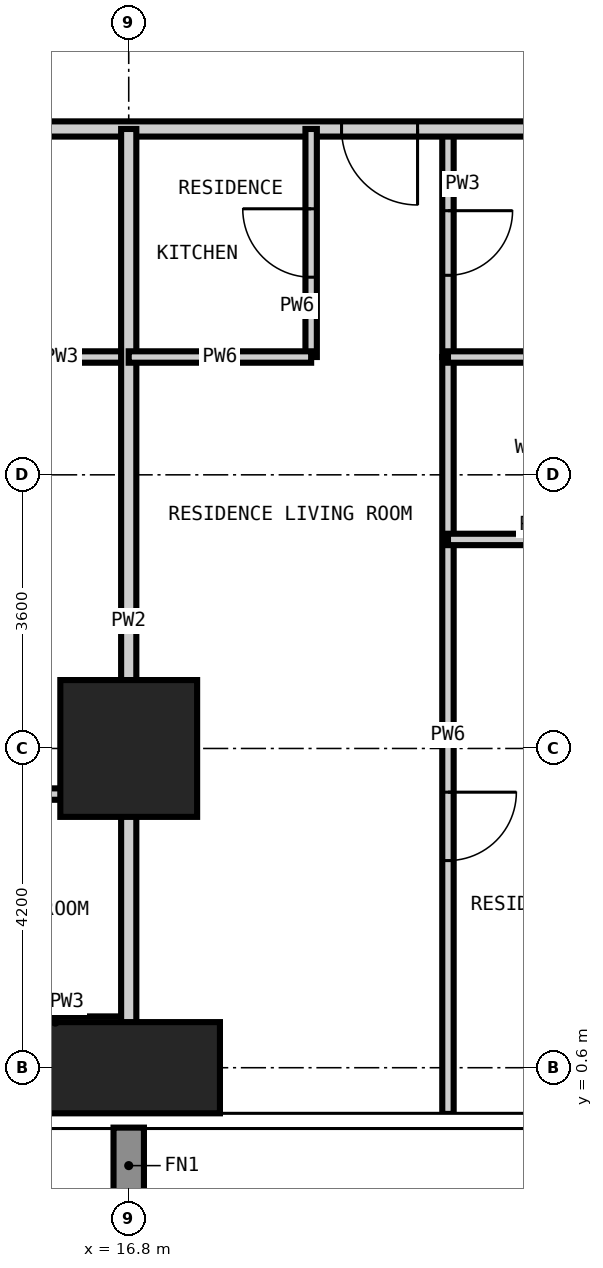
"""IFC4 building model, lengths in metres.
Left out: names, types, materials, properties, quantities, classifications, styles, units other than length and angle.
Written with IfcOpenShell. Run it as: python <this file> out.ifc"""

import sys

from ifc_helpers import new_model, si_unit, direction, frame, frame_2d, origin, origin_2d, place, context, subcontext, project, spatial, rectangle, extrude, element, fill, save


model = new_model("IFC4")
c1 = context("Model", 3, precision=1e-05, world=origin(), true_north=direction((0.0, 1.0)))
c2 = subcontext(c1, "Body", "Model", "MODEL_VIEW")
j1 = project(units=[si_unit("LENGTHUNIT", "METRE"), si_unit("PLANEANGLEUNIT", "RADIAN")], contexts=[c1])
p1 = place(None, origin())
s1 = spatial("IfcSite", under=j1, at=p1, CompositionType="ELEMENT")
p2 = place(p1, origin())
s2 = spatial("IfcBuilding", under=s1, at=p2, CompositionType="ELEMENT")
p3 = place(p2, frame((0.0, 0.0, 45.0)))
s3 = spatial("IfcBuildingStorey", under=s2, at=p3, CompositionType="ELEMENT", Elevation=45.0)
p4 = place(p3, frame((16.8, 0.6, -0.35), z_axis=(0.0, 0.0, 1.0), x_axis=(1.0, 0.0, 0.0)))
e1 = element("IfcColumn", 1, at=p4, inside=s3, PredefinedType="COLUMN", context=c2, shape_type="SweptSolid", body=[
    extrude(rectangle(XDim=2.4, YDim=1.2, at=origin_2d()), origin(), (0.0, 0.0, 1.0), 3.6),
])
p5 = place(p3, frame((16.8, 4.8, -0.35), z_axis=(0.0, 0.0, 1.0), x_axis=(1.0, 0.0, 0.0)))
e2 = element("IfcColumn", 2, at=p5, inside=s3, PredefinedType="COLUMN", context=c2, shape_type="SweptSolid", body=[
    extrude(rectangle(XDim=1.8, YDim=1.8, at=origin_2d()), origin(), (0.0, 0.0, 1.0), 3.6),
])
p6 = place(p3, frame((21.0, 9.95, 0.0), z_axis=(0.0, 0.0, 1.0), x_axis=(0.0, 1.0, 0.0)))
e3 = element("IfcWall", 3, at=p6, inside=s3, PredefinedType="PARTITIONING", context=c2, shape_type="SweptSolid", body=[
    extrude(rectangle(XDim=3.0, YDim=0.15, at=frame_2d((1.5, 0.0))), origin(), (0.0, 0.0, 1.0), 3.25),
])
p7 = place(p6, frame((1.075, 0.0, 0.0)))
e4 = element("IfcOpeningElement", 4, at=p7, cuts=e3, PredefinedType="OPENING", context=c2, shape_type="SweptSolid", body=[
    extrude(rectangle(XDim=0.85, YDim=2.1, at=frame_2d((0.425, 1.05))), frame((0.0, 0.085, 0.0), z_axis=(0.0, -1.0, 0.0), x_axis=(1.0, 0.0, 0.0)), (0.0, 0.0, 1.0), 0.17),
])
p8 = place(p3, frame((13.2, 1.2, 0.0), z_axis=(0.0, 0.0, 1.0), x_axis=(1.0, 0.0, 0.0)))
e5 = element("IfcWall", 5, at=p8, inside=s3, PredefinedType="PARTITIONING", context=c2, shape_type="SweptSolid", body=[
    extrude(rectangle(XDim=3.6, YDim=0.15, at=frame_2d((1.8, 0.0))), origin(), (0.0, 0.0, 1.0), 3.25),
])
p9 = place(p8, frame((1.375, 0.0, 0.0)))
e6 = element("IfcOpeningElement", 6, at=p9, cuts=e5, PredefinedType="OPENING", context=c2, shape_type="SweptSolid", body=[
    extrude(rectangle(XDim=0.85, YDim=2.1, at=frame_2d((0.425, 1.05))), frame((0.0, 0.085, 0.0), z_axis=(0.0, -1.0, 0.0), x_axis=(1.0, 0.0, 0.0)), (0.0, 0.0, 1.0), 0.17),
])
p10 = place(p3, frame((12.95, 9.95, 0.0), z_axis=(0.0, 0.0, 1.0), x_axis=(1.0, 0.0, 0.0)))
e7 = element("IfcWall", 7, at=p10, inside=s3, PredefinedType="PARTITIONING", context=c2, shape_type="SweptSolid", body=[
    extrude(rectangle(XDim=3.85, YDim=0.15, at=frame_2d((1.925, 0.0))), origin(), (0.0, 0.0, 1.0), 3.25),
])
p11 = place(p10, frame((1.5, 0.0, 0.0)))
e8 = element("IfcOpeningElement", 8, at=p11, cuts=e7, PredefinedType="OPENING", context=c2, shape_type="SweptSolid", body=[
    extrude(rectangle(XDim=0.85, YDim=2.1, at=frame_2d((0.425, 1.05))), frame((0.0, 0.085, 0.0), z_axis=(0.0, -1.0, 0.0), x_axis=(1.0, 0.0, 0.0)), (0.0, 0.0, 1.0), 0.17),
])
p12 = place(p3, frame((45.25, 12.95, 0.0), z_axis=(0.0, 0.0, 1.0), x_axis=(-1.0, 0.0, 0.0)))
e9 = element("IfcWall", 9, at=p12, inside=s3, PredefinedType="PARTITIONING", context=c2, shape_type="SweptSolid", body=[
    extrude(rectangle(XDim=32.3, YDim=0.2, at=frame_2d((16.15, 0.0))), origin(), (0.0, 0.0, 1.0), 3.25),
])
p13 = place(p12, frame((24.65, 0.0, 0.0)))
e10 = element("IfcOpeningElement", 10, at=p13, cuts=e9, PredefinedType="OPENING", context=c2, shape_type="SweptSolid", body=[
    extrude(rectangle(XDim=1.0, YDim=2.2, at=frame_2d((0.5, 1.1))), frame((0.0, 0.11, 0.0), z_axis=(0.0, -1.0, 0.0), x_axis=(1.0, 0.0, 0.0)), (0.0, 0.0, 1.0), 0.22),
])
p14 = place(p12, frame((16.25, 0.0, 0.0)))
e11 = element("IfcOpeningElement", 11, at=p14, cuts=e9, PredefinedType="OPENING", context=c2, shape_type="SweptSolid", body=[
    extrude(rectangle(XDim=1.0, YDim=2.2, at=frame_2d((0.5, 1.1))), frame((0.0, 0.11, 0.0), z_axis=(0.0, -1.0, 0.0), x_axis=(1.0, 0.0, 0.0)), (0.0, 0.0, 1.0), 0.22),
])
p15 = place(p12, frame((7.85, 0.0, 0.0)))
e12 = element("IfcOpeningElement", 12, at=p15, cuts=e9, PredefinedType="OPENING", context=c2, shape_type="SweptSolid", body=[
    extrude(rectangle(XDim=1.0, YDim=2.2, at=frame_2d((0.5, 1.1))), frame((0.0, 0.11, 0.0), z_axis=(0.0, -1.0, 0.0), x_axis=(1.0, 0.0, 0.0)), (0.0, 0.0, 1.0), 0.22),
])
p16 = place(p3, frame((16.8, -0.008, 0.0), z_axis=(0.0, 0.0, 1.0), x_axis=(0.0, 1.0, 0.0)))
e13 = element("IfcWall", 13, at=p16, inside=s3, PredefinedType="PARTITIONING", context=c2, shape_type="SweptSolid", body=[
    extrude(rectangle(XDim=12.958, YDim=0.2, at=frame_2d((6.479, 0.0))), origin(), (0.0, 0.0, 1.0), 3.25),
])
p17 = place(p3, frame((19.2, 9.95, 0.0), z_axis=(0.0, 0.0, 1.0), x_axis=(0.0, 1.0, 0.0)))
e14 = element("IfcWall", 14, at=p17, inside=s3, PredefinedType="PARTITIONING", context=c2, shape_type="SweptSolid", body=[
    extrude(rectangle(XDim=3.0, YDim=0.15, at=frame_2d((1.5, 0.0))), origin(), (0.0, 0.0, 1.0), 3.25),
])
p18 = place(p17, frame((1.05, 0.0, 0.0)))
e15 = element("IfcOpeningElement", 15, at=p18, cuts=e14, PredefinedType="OPENING", context=c2, shape_type="SweptSolid", body=[
    extrude(rectangle(XDim=0.9, YDim=2.1, at=frame_2d((0.45, 1.05))), frame((0.0, 0.085, 0.0), z_axis=(0.0, -1.0, 0.0), x_axis=(1.0, 0.0, 0.0)), (0.0, 0.0, 1.0), 0.17),
])
p19 = place(p3, frame((21.0, -0.008, 0.0), z_axis=(0.0, 0.0, 1.0), x_axis=(0.0, 1.0, 0.0)))
e16 = element("IfcWall", 16, at=p19, inside=s3, PredefinedType="PARTITIONING", context=c2, shape_type="SweptSolid", body=[
    extrude(rectangle(XDim=9.958, YDim=0.15, at=frame_2d((4.979, 0.0))), origin(), (0.0, 0.0, 1.0), 3.25),
])
p20 = place(p19, frame((3.333, 0.0, 0.0)))
e17 = element("IfcOpeningElement", 17, at=p20, cuts=e16, PredefinedType="OPENING", context=c2, shape_type="SweptSolid", body=[
    extrude(rectangle(XDim=0.9, YDim=2.1, at=frame_2d((0.45, 1.05))), frame((0.0, 0.085, 0.0), z_axis=(0.0, -1.0, 0.0), x_axis=(1.0, 0.0, 0.0)), (0.0, 0.0, 1.0), 0.17),
])
p21 = place(p3, frame((-0.008, 4.2, 0.0), z_axis=(0.0, 0.0, 1.0), x_axis=(1.0, 0.0, 0.0)))
e18 = element("IfcWall", 18, at=p21, inside=s3, PredefinedType="PARTITIONING", context=c2, shape_type="SweptSolid", body=[
    extrude(rectangle(XDim=16.808, YDim=0.15, at=frame_2d((8.404, 0.0))), origin(), (0.0, 0.0, 1.0), 3.25),
])
p22 = place(p21, frame((4.958, 0.0, 0.0)))
e19 = element("IfcOpeningElement", 19, at=p22, cuts=e18, PredefinedType="OPENING", context=c2, shape_type="SweptSolid", body=[
    extrude(rectangle(XDim=0.9, YDim=2.1, at=frame_2d((0.45, 1.05))), frame((0.0, 0.085, 0.0), z_axis=(0.0, -1.0, 0.0), x_axis=(1.0, 0.0, 0.0)), (0.0, 0.0, 1.0), 0.17),
])
p23 = place(p3, frame((21.0, 7.55, 0.0), z_axis=(0.0, 0.0, 1.0), x_axis=(1.0, 0.0, 0.0)))
e20 = element("IfcWall", 20, at=p23, inside=s3, PredefinedType="PARTITIONING", context=c2, shape_type="SweptSolid", body=[
    extrude(rectangle(XDim=4.2, YDim=0.15, at=frame_2d((2.1, 0.0))), origin(), (0.0, 0.0, 1.0), 3.25),
])
p24 = place(p23, frame((1.65, 0.0, 0.0)))
e21 = element("IfcOpeningElement", 21, at=p24, cuts=e20, PredefinedType="OPENING", context=c2, shape_type="SweptSolid", body=[
    extrude(rectangle(XDim=0.9, YDim=2.1, at=frame_2d((0.45, 1.05))), frame((0.0, 0.085, 0.0), z_axis=(0.0, -1.0, 0.0), x_axis=(1.0, 0.0, 0.0)), (0.0, 0.0, 1.0), 0.17),
])
p25 = place(p3, frame((16.8, 9.95, 0.0), z_axis=(0.0, 0.0, 1.0), x_axis=(1.0, 0.0, 0.0)))
e22 = element("IfcWall", 22, at=p25, inside=s3, PredefinedType="PARTITIONING", context=c2, shape_type="SweptSolid", body=[
    extrude(rectangle(XDim=2.4, YDim=0.15, at=frame_2d((1.2, 0.0))), origin(), (0.0, 0.0, 1.0), 3.25),
])
p26 = place(p3, frame((21.0, 9.95, 0.0), z_axis=(0.0, 0.0, 1.0), x_axis=(1.0, 0.0, 0.0)))
e23 = element("IfcWall", 23, at=p26, inside=s3, PredefinedType="PARTITIONING", context=c2, shape_type="SweptSolid", body=[
    extrude(rectangle(XDim=6.6, YDim=0.15, at=frame_2d((3.3, 0.0))), origin(), (0.0, 0.0, 1.0), 3.25),
])
p27 = place(p13, origin())
e24 = element("IfcDoor", 24, at=p27, inside=s3, OperationType="SINGLE_SWING_LEFT", PredefinedType="DOOR", context=c2, shape_type="SweptSolid", body=[
    extrude(rectangle(XDim=1.0, YDim=2.2, at=frame_2d((0.5, 1.1))), frame((0.0, 0.025, 0.0), z_axis=(0.0, -1.0, 0.0), x_axis=(1.0, 0.0, 0.0)), (0.0, 0.0, 1.0), 0.05),
])
fill(e10, e24)
p28 = place(p18, origin())
e25 = element("IfcDoor", 25, at=p28, inside=s3, OperationType="SINGLE_SWING_RIGHT", PredefinedType="DOOR", context=c2, shape_type="SweptSolid", body=[
    extrude(rectangle(XDim=0.9, YDim=2.1, at=frame_2d((0.45, 1.05))), frame((0.0, 0.025, 0.0), z_axis=(0.0, -1.0, 0.0), x_axis=(1.0, 0.0, 0.0)), (0.0, 0.0, 1.0), 0.05),
])
fill(e15, e25)
p29 = place(p7, frame((0.85, 0.0, 0.0), z_axis=(0.0, 0.0, 1.0), x_axis=(-1.0, 0.0, 0.0)))
e26 = element("IfcDoor", 26, at=p29, inside=s3, OperationType="SINGLE_SWING_LEFT", PredefinedType="DOOR", context=c2, shape_type="SweptSolid", body=[
    extrude(rectangle(XDim=0.85, YDim=2.1, at=frame_2d((0.425, 1.05))), frame((0.0, 0.025, 0.0), z_axis=(0.0, -1.0, 0.0), x_axis=(1.0, 0.0, 0.0)), (0.0, 0.0, 1.0), 0.05),
])
fill(e4, e26)
p30 = place(p20, frame((0.9, 0.0, 0.0), z_axis=(0.0, 0.0, 1.0), x_axis=(-1.0, 0.0, 0.0)))
e27 = element("IfcDoor", 27, at=p30, inside=s3, OperationType="SINGLE_SWING_LEFT", PredefinedType="DOOR", context=c2, shape_type="SweptSolid", body=[
    extrude(rectangle(XDim=0.9, YDim=2.1, at=frame_2d((0.45, 1.05))), frame((0.0, 0.025, 0.0), z_axis=(0.0, -1.0, 0.0), x_axis=(1.0, 0.0, 0.0)), (0.0, 0.0, 1.0), 0.05),
])
fill(e17, e27)
save(model, sys.argv[1])
